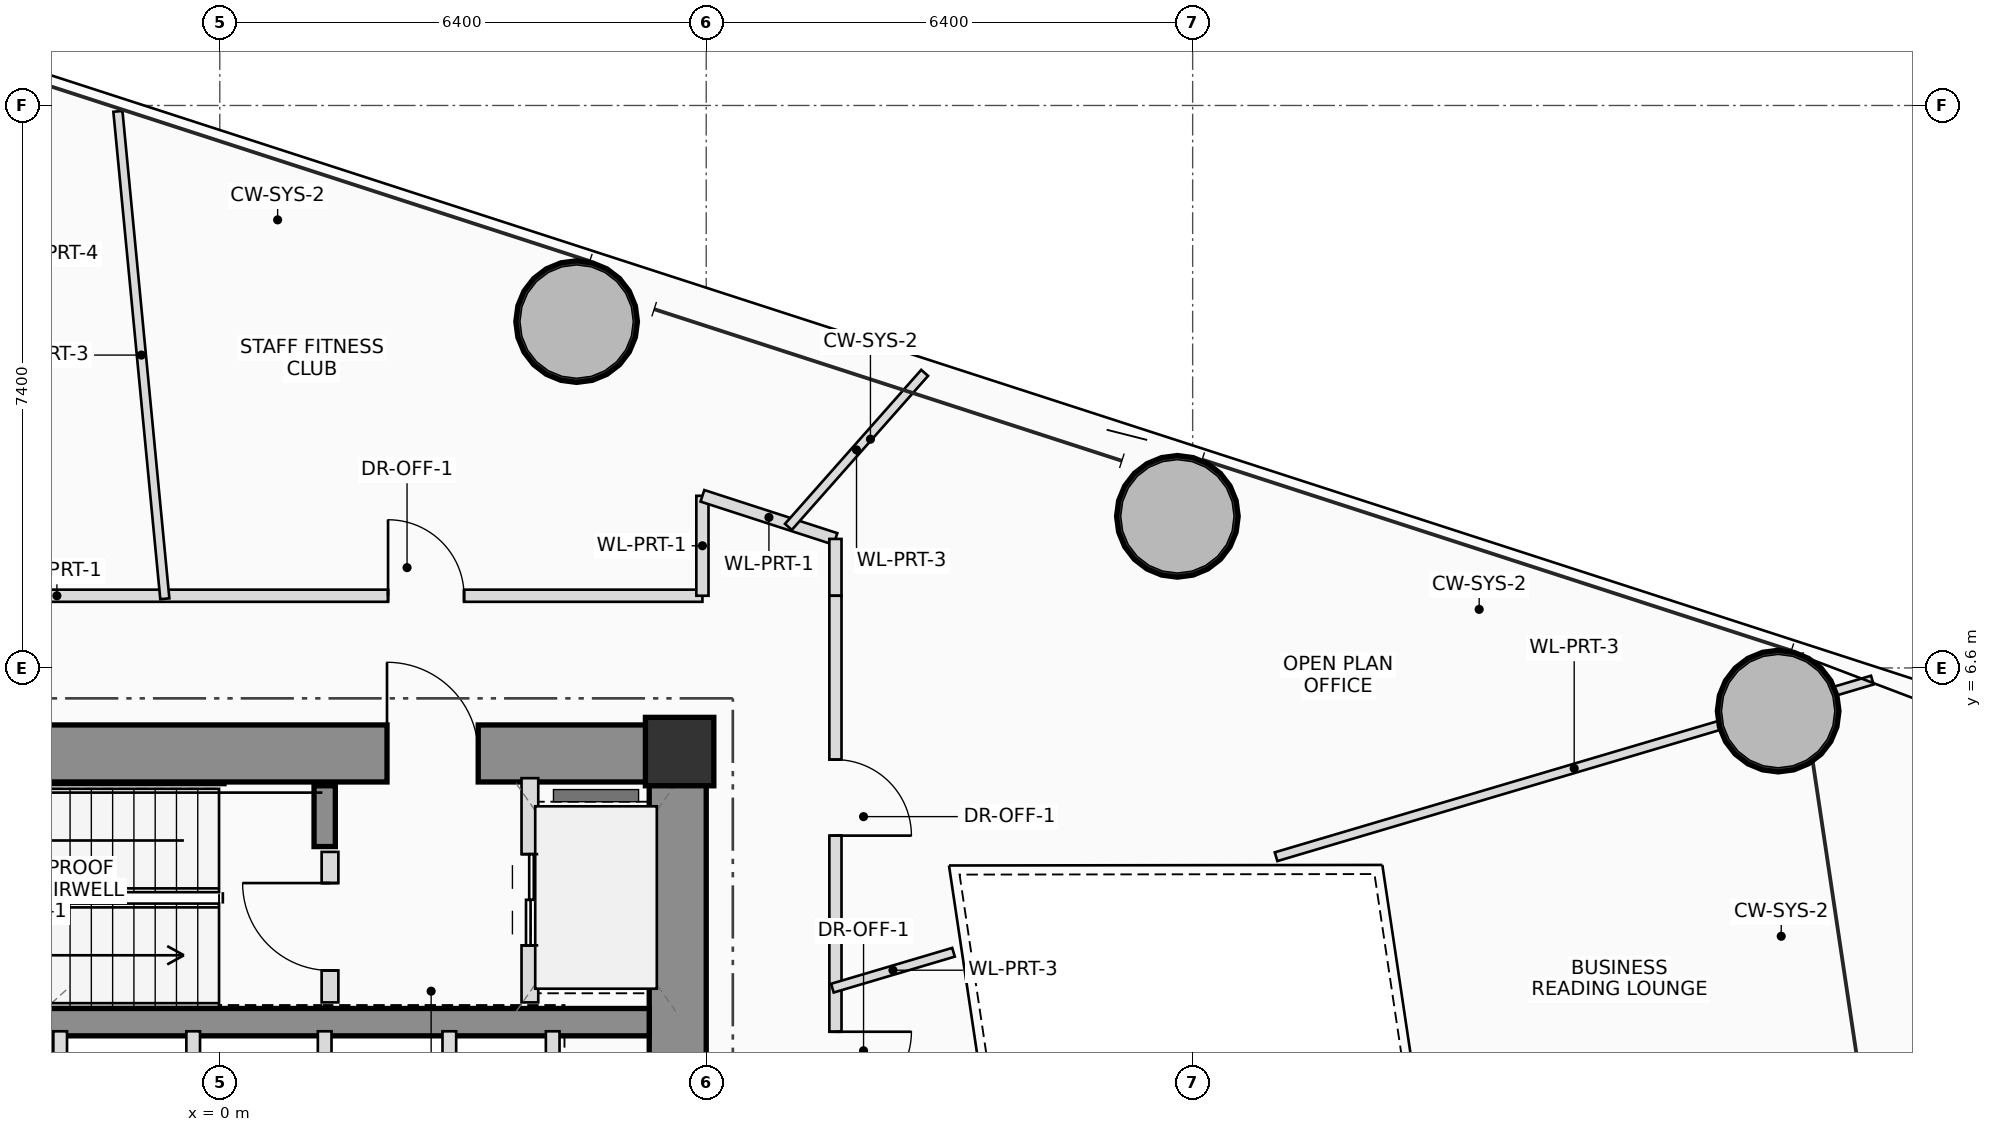
"""IFC4 building model, lengths in metres.
Left out: names, types, materials, properties, quantities, classifications, styles, units other than length and angle.
Written with IfcOpenShell. Run it as: python <this file> out.ifc"""

import sys

from ifc_helpers import new_model, si_unit, direction, frame, frame_2d, origin, origin_2d, place, context, subcontext, project, spatial, rectangle, hollow_circle, extrude, source, transform, mapped, element, fill, save


model = new_model("IFC4")
c1 = context("Model", 3, precision=1e-05, world=origin(), true_north=direction((0.0, 1.0)))
c2 = subcontext(c1, "Body", "Model", "MODEL_VIEW")
j1 = project(units=[si_unit("LENGTHUNIT", "METRE"), si_unit("PLANEANGLEUNIT", "RADIAN")], contexts=[c1])
p1 = place(None, origin())
s1 = spatial("IfcSite", under=j1, at=p1, CompositionType="ELEMENT")
p2 = place(p1, origin())
s2 = spatial("IfcBuilding", under=s1, at=p2, CompositionType="ELEMENT")
p3 = place(p2, frame((0.0, 0.0, 66.05)))
s3 = spatial("IfcBuildingStorey", under=s2, at=p3, CompositionType="ELEMENT", Elevation=66.05)
m1 = source(origin(), c2, "Body", "SweptSolid", [
    extrude(rectangle(XDim=0.9, YDim=0.9, at=origin_2d()), origin(), (0.0, 0.0, 1.0), 3.75),
])
p4 = place(p3, frame((6.05, 5.5, 0.0), z_axis=(0.0, 0.0, 1.0), x_axis=(1.0, 0.0, 0.0)))
e1 = element("IfcColumn", 1, at=p4, inside=s3, PredefinedType="COLUMN", context=c2, shape_type="MappedRepresentation", body=[
    mapped(m1, transform((0.0, 0.0, 0.0), scale=1.0)),
])
p5 = place(p3, frame((-6.4, 5.475, 0.0), z_axis=(0.0, 0.0, 1.0), x_axis=(1.0, 0.0, 0.0)))
e2 = element("IfcWall", 2, at=p5, inside=s3, PredefinedType="SHEAR", context=c2, shape_type="SweptSolid", body=[
    extrude(rectangle(XDim=12.8, YDim=0.75, at=frame_2d((6.4, 0.0))), origin(), (0.0, 0.0, 1.0), 3.75),
])
p6 = place(p5, frame((8.6, 0.0, 0.0)))
e3 = element("IfcOpeningElement", 3, at=p6, cuts=e2, PredefinedType="OPENING", context=c2, shape_type="SweptSolid", body=[
    extrude(rectangle(XDim=1.2, YDim=2.2, at=frame_2d((0.6, 1.1))), frame((0.0, 0.385, 0.0), z_axis=(0.0, -1.0, 0.0), x_axis=(1.0, 0.0, 0.0)), (0.0, 0.0, 1.0), 0.77),
])
p7 = place(p3, frame((6.025, -5.1, 0.0), z_axis=(0.0, 0.0, 1.0), x_axis=(0.0, 1.0, 0.0)))
e4 = element("IfcWall", 4, at=p7, inside=s3, PredefinedType="SHEAR", context=c2, shape_type="SweptSolid", body=[
    extrude(rectangle(XDim=10.2, YDim=0.75, at=frame_2d((5.1, 0.0))), origin(), (0.0, 0.0, 1.0), 3.75),
])
p8 = place(p3, frame((-5.65, 1.94, 0.0), z_axis=(0.0, 0.0, 1.0), x_axis=(1.0, 0.0, 0.0)))
e5 = element("IfcWall", 5, at=p8, inside=s3, PredefinedType="SHEAR", context=c2, shape_type="SweptSolid", body=[
    extrude(rectangle(XDim=11.3, YDim=0.36, at=frame_2d((5.65, 0.0))), origin(), (0.0, 0.0, 1.0), 3.75),
])
p9 = place(p3, frame((1.38, 4.25, 0.0), z_axis=(0.0, 0.0, 1.0), x_axis=(0.0, 1.0, 0.0)))
e6 = element("IfcWall", 6, at=p9, inside=s3, PredefinedType="SHEAR", context=c2, shape_type="SweptSolid", body=[
    extrude(rectangle(XDim=0.8, YDim=0.28, at=frame_2d((0.4, 0.0))), origin(), (0.0, 0.0, 1.0), 3.75),
])
m2 = source(origin(), c2, "Body", "SweptSolid", [
    extrude(hollow_circle(Radius=0.8, WallThickness=0.055, at=origin_2d()), origin(), (0.0, 0.0, 1.0), 3.75),
])
for number, where, z_axis, x_axis in (
    (7, (20.503, 6.032, 0.0), (0.0, 0.0, 1.0), (1.0, 0.0, 0.0)),
    (8, (12.599, 8.594, 0.0), (0.0, 0.0, 1.0), (1.0, 0.0, 0.0)),
    (9, (4.695, 11.157, 0.0), (0.0, 0.0, 1.0), (1.0, 0.0, 0.0)),
):
    element("IfcColumn", number, at=place(p3, frame(where, z_axis=z_axis, x_axis=x_axis)), inside=s3, PredefinedType="COLUMN", context=c2, shape_type="MappedRepresentation", body=[
        mapped(m2, transform((0.0, 0.0, 0.0), scale=1.0)),
    ])
p10 = place(p3, frame((1.45, 2.2, 0.0), z_axis=(0.0, 0.0, 1.0), x_axis=(0.0, 1.0, 0.0)))
e10 = element("IfcWall", 10, at=p10, inside=s3, PredefinedType="PLUMBINGWALL", context=c2, shape_type="SweptSolid", body=[
    extrude(rectangle(XDim=1.98, YDim=0.22, at=frame_2d((0.99, 0.0))), origin(), (0.0, 0.0, 1.0), 3.545),
])
p11 = place(p10, frame((0.42, 0.0, 0.0)))
e11 = element("IfcOpeningElement", 11, at=p11, cuts=e10, PredefinedType="OPENING", context=c2, shape_type="SweptSolid", body=[
    extrude(rectangle(XDim=1.15, YDim=2.15, at=frame_2d((0.575, 1.075))), frame((0.0, 0.12, 0.0), z_axis=(0.0, -1.0, 0.0), x_axis=(1.0, 0.0, 0.0)), (0.0, 0.0, 1.0), 0.24),
])
p12 = place(p3, frame((4.08, 2.2, 0.0), z_axis=(0.0, 0.0, 1.0), x_axis=(0.0, 1.0, 0.0)))
e12 = element("IfcWall", 12, at=p12, inside=s3, PredefinedType="PLUMBINGWALL", context=c2, shape_type="SweptSolid", body=[
    extrude(rectangle(XDim=2.95, YDim=0.22, at=frame_2d((1.475, 0.0))), origin(), (0.0, 0.0, 1.0), 3.545),
])
p13 = place(p12, frame((0.75, 0.0, 0.0)))
e13 = element("IfcOpeningElement", 13, at=p13, cuts=e12, PredefinedType="OPENING", context=c2, shape_type="SweptSolid", body=[
    extrude(rectangle(XDim=1.2, YDim=2.25, at=frame_2d((0.6, 1.125))), frame((0.0, 0.12, 0.0), z_axis=(0.0, -1.0, 0.0), x_axis=(1.0, 0.0, 0.0)), (0.0, 0.0, 1.0), 0.24),
])
for number, where, z_axis, x_axis in (
    (14, (-2.1, 0.84, 0.0), (0.0, 0.0, 1.0), (0.0, 1.0, 0.0)),
    (15, (-0.35, 0.84, 0.0), (0.0, 0.0, 1.0), (0.0, 1.0, 0.0)),
    (16, (1.38, 0.84, 0.0), (0.0, 0.0, 1.0), (0.0, 1.0, 0.0)),
    (17, (3.02, 0.84, 0.0), (0.0, 0.0, 1.0), (0.0, 1.0, 0.0)),
    (18, (4.38, 0.84, 0.0), (0.0, 0.0, 1.0), (0.0, 1.0, 0.0)),
):
    element("IfcWall", number, at=place(p3, frame(where, z_axis=z_axis, x_axis=x_axis)), inside=s3, PredefinedType="PLUMBINGWALL", context=c2, shape_type="SweptSolid", body=[
        extrude(rectangle(XDim=0.98, YDim=0.18, at=frame_2d((0.49, 0.0))), origin(), (0.0, 0.0, 1.0), 3.545),
    ])
p14 = place(p3, frame((-6.35, 7.55, 0.0), z_axis=(0.0, 0.0, 1.0), x_axis=(1.0, 0.0, 0.0)))
e19 = element("IfcWall", 19, at=p14, inside=s3, PredefinedType="PARTITIONING", context=c2, shape_type="SweptSolid", body=[
    extrude(rectangle(XDim=12.7, YDim=0.16, at=frame_2d((6.35, 0.0))), origin(), (0.0, 0.0, 1.0), 2.85),
])
p15 = place(p14, frame((8.564, 0.0, 0.0)))
e20 = element("IfcOpeningElement", 20, at=p15, cuts=e19, PredefinedType="OPENING", context=c2, shape_type="SweptSolid", body=[
    extrude(rectangle(XDim=1.0, YDim=2.25, at=frame_2d((0.5, 1.125))), frame((0.0, 0.09, 0.0), z_axis=(0.0, -1.0, 0.0), x_axis=(1.0, 0.0, 0.0)), (0.0, 0.0, 1.0), 0.18),
])
p16 = place(p3, frame((6.35, 7.55, 0.0), z_axis=(0.0, 0.0, 1.0), x_axis=(0.0, 1.0, 0.0)))
e21 = element("IfcWall", 21, at=p16, inside=s3, PredefinedType="PARTITIONING", context=c2, shape_type="SweptSolid", body=[
    extrude(rectangle(XDim=1.315, YDim=0.16, at=frame_2d((0.657, 0.0))), origin(), (0.0, 0.0, 1.0), 3.05),
])
p17 = place(p3, frame((6.35, 8.865, 0.0), z_axis=(0.0, 0.0, 1.0), x_axis=(0.951291213681, -0.308293734568, 0.0)))
e22 = element("IfcWall", 22, at=p17, inside=s3, PredefinedType="PARTITIONING", context=c2, shape_type="SweptSolid", body=[
    extrude(rectangle(XDim=1.84, YDim=0.16, at=frame_2d((0.92, 0.0))), origin(), (0.0, 0.0, 1.0), 3.2),
])
p18 = place(p3, frame((8.1, 8.298, 0.0), z_axis=(0.0, 0.0, 1.0), x_axis=(0.0, -1.0, 0.0)))
e23 = element("IfcWall", 23, at=p18, inside=s3, PredefinedType="PARTITIONING", context=c2, shape_type="SweptSolid", body=[
    extrude(rectangle(XDim=0.748, YDim=0.16, at=frame_2d((0.374, 0.0))), origin(), (0.0, 0.0, 1.0), 3.545),
])
p19 = place(p3, frame((8.1, 7.55, 0.0), z_axis=(0.0, 0.0, 1.0), x_axis=(0.0, -1.0, 0.0)))
e24 = element("IfcWall", 24, at=p19, inside=s3, PredefinedType="PARTITIONING", context=c2, shape_type="SweptSolid", body=[
    extrude(rectangle(XDim=7.53, YDim=0.16, at=frame_2d((3.765, 0.0))), origin(), (0.0, 0.0, 1.0), 2.85),
])
p20 = place(p19, frame((2.156, 0.0, 0.0)))
e25 = element("IfcOpeningElement", 25, at=p20, cuts=e24, PredefinedType="OPENING", context=c2, shape_type="SweptSolid", body=[
    extrude(rectangle(XDim=1.0, YDim=2.25, at=frame_2d((0.5, 1.125))), frame((0.0, 0.09, 0.0), z_axis=(0.0, -1.0, 0.0), x_axis=(1.0, 0.0, 0.0)), (0.0, 0.0, 1.0), 0.18),
])
p21 = place(p19, frame((5.736, 0.0, 0.0)))
e26 = element("IfcOpeningElement", 26, at=p21, cuts=e24, PredefinedType="OPENING", context=c2, shape_type="SweptSolid", body=[
    extrude(rectangle(XDim=1.0, YDim=2.25, at=frame_2d((0.5, 1.125))), frame((0.0, 0.09, 0.0), z_axis=(0.0, -1.0, 0.0), x_axis=(1.0, 0.0, 0.0)), (0.0, 0.0, 1.0), 0.18),
])
p22 = place(p3, frame((-0.723, 7.51, 0.0), z_axis=(0.0, 0.0, 1.0), x_axis=(-0.095840941038, 0.995396661648, 0.0)))
e27 = element("IfcWall", 27, at=p22, inside=s3, PredefinedType="PARTITIONING", context=c2, shape_type="SweptSolid", body=[
    extrude(rectangle(XDim=6.442, YDim=0.12, at=frame_2d((3.221, 0.0))), origin(), (0.0, 0.0, 1.0), 3.01),
])
p23 = place(p3, frame((8.06, 2.387, 0.0), z_axis=(0.0, 0.0, 1.0), x_axis=(0.958783289971, 0.28413835164, 0.0)))
e28 = element("IfcWall", 28, at=p23, inside=s3, PredefinedType="PARTITIONING", context=c2, shape_type="SweptSolid", body=[
    extrude(rectangle(XDim=1.662, YDim=0.12, at=frame_2d((0.831, 0.0))), origin(), (0.0, 0.0, 1.0), 3.21),
])
p24 = place(p3, frame((13.897, 4.117, 0.0), z_axis=(0.0, 0.0, 1.0), x_axis=(0.958827308203, 0.283989776303, 0.0)))
e29 = element("IfcWall", 29, at=p24, inside=s3, PredefinedType="PARTITIONING", context=c2, shape_type="SweptSolid", body=[
    extrude(rectangle(XDim=8.182, YDim=0.12, at=frame_2d((4.091, 0.0))), origin(), (0.0, 0.0, 1.0), 2.85),
])
p25 = place(p3, frame((7.481, 8.456, 0.0), z_axis=(0.0, 0.0, 1.0), x_axis=(0.662647880096, 0.7489310963, 0.0)))
e30 = element("IfcWall", 30, at=p25, inside=s3, PredefinedType="PARTITIONING", context=c2, shape_type="SweptSolid", body=[
    extrude(rectangle(XDim=2.705, YDim=0.12, at=frame_2d((1.353, 0.0))), origin(), (0.0, 0.0, 1.0), 3.01),
])
p26 = place(p6, origin())
e31 = element("IfcDoor", 31, at=p26, inside=s3, OperationType="SINGLE_SWING_LEFT", PredefinedType="DOOR", context=c2, shape_type="SweptSolid", body=[
    extrude(rectangle(XDim=1.2, YDim=2.2, at=frame_2d((0.6, 1.1))), frame((0.0, 0.025, 0.0), z_axis=(0.0, -1.0, 0.0), x_axis=(1.0, 0.0, 0.0)), (0.0, 0.0, 1.0), 0.05),
])
fill(e3, e31)
p27 = place(p11, origin())
e32 = element("IfcDoor", 32, at=p27, inside=s3, OperationType="SINGLE_SWING_RIGHT", PredefinedType="DOOR", context=c2, shape_type="SweptSolid", body=[
    extrude(rectangle(XDim=1.15, YDim=2.15, at=frame_2d((0.575, 1.075))), frame((0.0, 0.025, 0.0), z_axis=(0.0, -1.0, 0.0), x_axis=(1.0, 0.0, 0.0)), (0.0, 0.0, 1.0), 0.05),
])
fill(e11, e32)
p28 = place(p13, origin())
e33 = element("IfcDoor", 33, at=p28, inside=s3, OperationType="DOUBLE_DOOR_SLIDING", PredefinedType="DOOR", context=c2, shape_type="SweptSolid", body=[
    extrude(rectangle(XDim=1.2, YDim=2.25, at=frame_2d((0.6, 1.125))), frame((0.0, 0.025, 0.0), z_axis=(0.0, -1.0, 0.0), x_axis=(1.0, 0.0, 0.0)), (0.0, 0.0, 1.0), 0.05),
])
fill(e13, e33)
p29 = place(p15, origin())
e34 = element("IfcDoor", 34, at=p29, inside=s3, OperationType="SINGLE_SWING_LEFT", PredefinedType="DOOR", context=c2, shape_type="SweptSolid", body=[
    extrude(rectangle(XDim=1.0, YDim=2.25, at=frame_2d((0.5, 1.125))), frame((0.0, 0.025, 0.0), z_axis=(0.0, -1.0, 0.0), x_axis=(1.0, 0.0, 0.0)), (0.0, 0.0, 1.0), 0.05),
])
fill(e20, e34)
p30 = place(p20, origin())
e35 = element("IfcDoor", 35, at=p30, inside=s3, OperationType="SINGLE_SWING_RIGHT", PredefinedType="DOOR", context=c2, shape_type="SweptSolid", body=[
    extrude(rectangle(XDim=1.0, YDim=2.25, at=frame_2d((0.5, 1.125))), frame((0.0, 0.025, 0.0), z_axis=(0.0, -1.0, 0.0), x_axis=(1.0, 0.0, 0.0)), (0.0, 0.0, 1.0), 0.05),
])
fill(e25, e35)
p31 = place(p21, origin())
e36 = element("IfcDoor", 36, at=p31, inside=s3, OperationType="SINGLE_SWING_LEFT", PredefinedType="DOOR", context=c2, shape_type="SweptSolid", body=[
    extrude(rectangle(XDim=1.0, YDim=2.25, at=frame_2d((0.5, 1.125))), frame((0.0, 0.025, 0.0), z_axis=(0.0, -1.0, 0.0), x_axis=(1.0, 0.0, 0.0)), (0.0, 0.0, 1.0), 0.05),
])
fill(e26, e36)
save(model, sys.argv[1])
